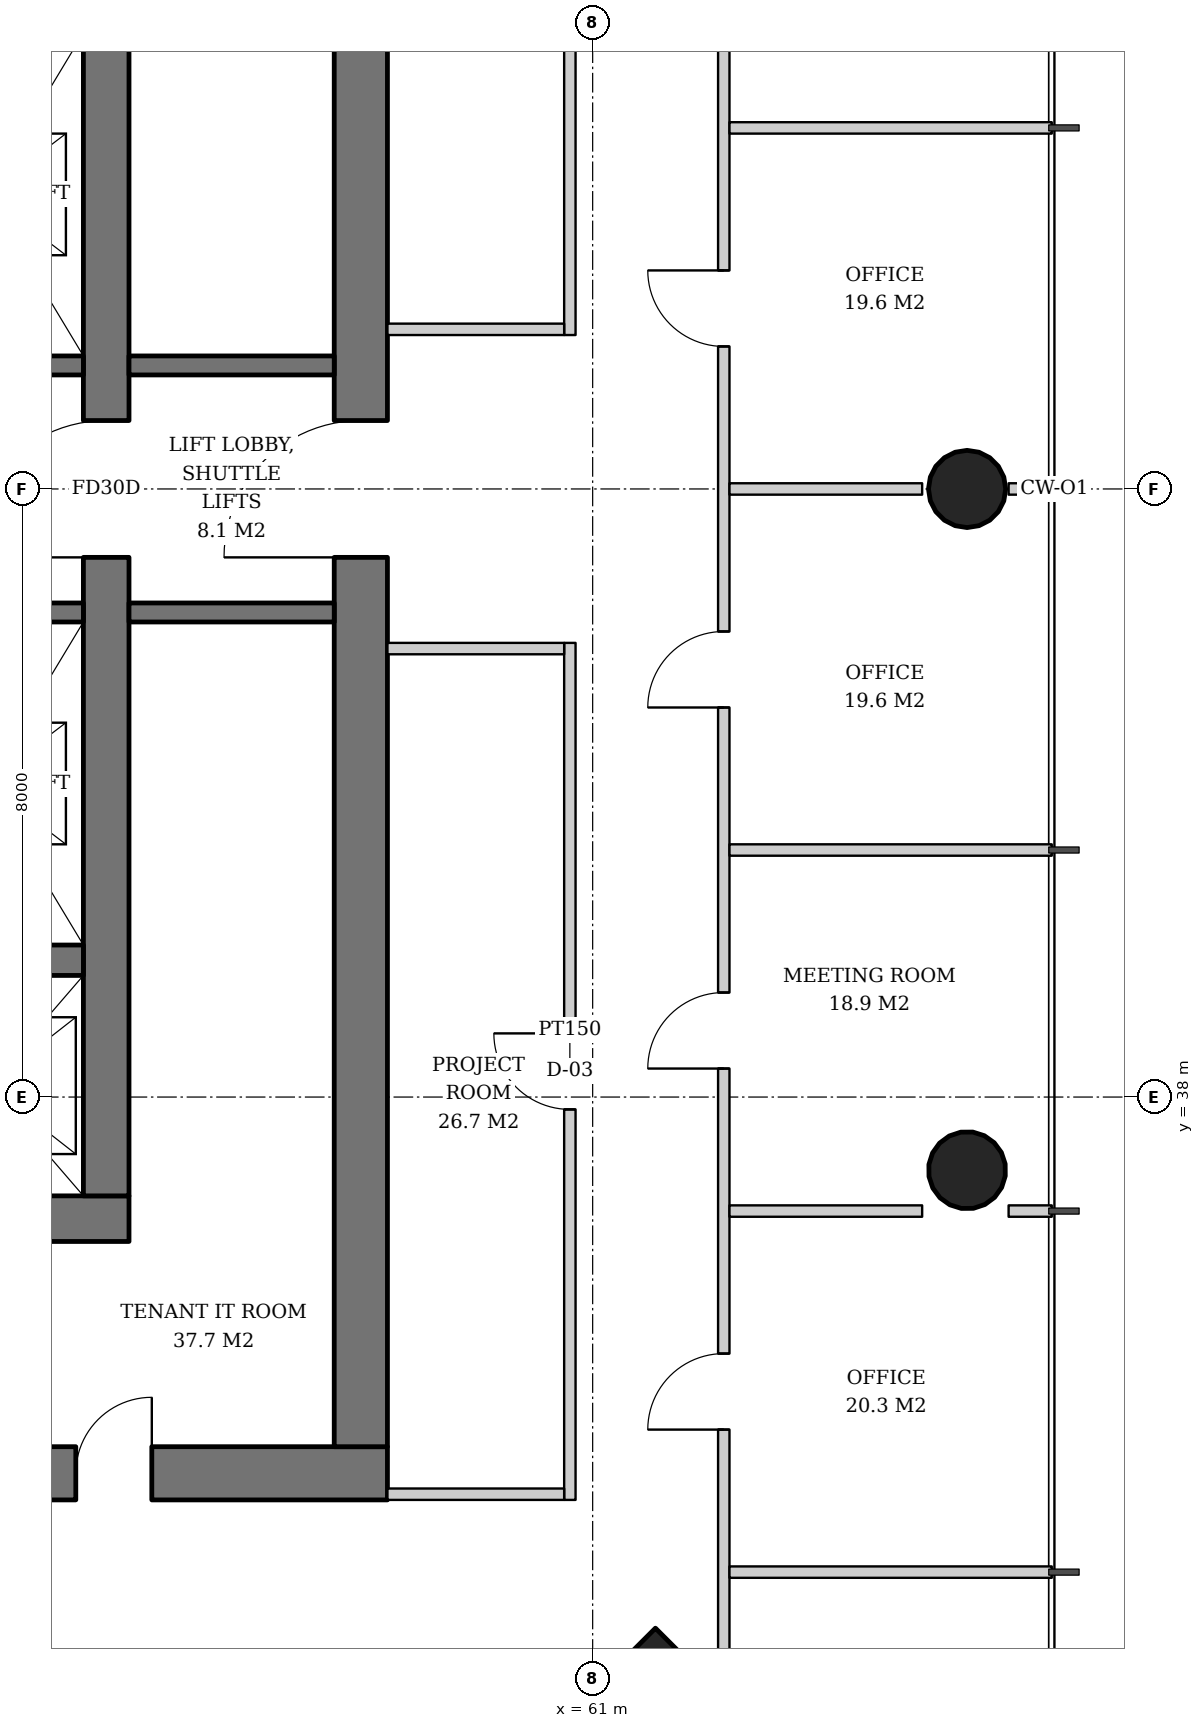
"""IFC4 building model, lengths in metres.
Left out: names, types, materials, properties, quantities, classifications, styles, units other than length and angle.
Written with IfcOpenShell. Run it as: python <this file> out.ifc"""

import sys

from ifc_helpers import new_model, si_unit, direction, frame, frame_2d, origin, origin_2d, place, context, subcontext, project, spatial, rectangle, hollow_circle, extrude, element, fill, save


model = new_model("IFC4")
c1 = context("Model", 3, precision=1e-05, world=origin(), true_north=direction((0.0, 1.0)))
c2 = subcontext(c1, "Body", "Model", "MODEL_VIEW")
j1 = project(units=[si_unit("LENGTHUNIT", "METRE"), si_unit("PLANEANGLEUNIT", "RADIAN")], contexts=[c1])
p1 = place(None, origin())
s1 = spatial("IfcSite", under=j1, at=p1, CompositionType="ELEMENT")
p2 = place(p1, origin())
s2 = spatial("IfcBuilding", under=s1, at=p2, CompositionType="ELEMENT")
p3 = place(p2, frame((0.0, 0.0, 116.0)))
s3 = spatial("IfcBuildingStorey", under=s2, at=p3, CompositionType="ELEMENT", Elevation=116.0)
p4 = place(p3, frame((65.964, 37.018, 0.0), z_axis=(-0.031974409754, 0.015987204877, 0.999360818924), x_axis=(-0.4472135955, -0.894427191, 0.0)))
e1 = element("IfcColumn", 1, at=p4, inside=s3, PredefinedType="COLUMN", context=c2, shape_type="SweptSolid", body=[
    extrude(hollow_circle(Radius=0.508, WallThickness=0.04, at=origin_2d()), origin(), (0.0, 0.0, 1.0), 3.802),
])
p5 = place(p3, frame((65.964, 46.0, 0.0), z_axis=(-0.031978496719, 0.0, 0.999488557087), x_axis=(0.0, -1.0, 0.0)))
e2 = element("IfcColumn", 2, at=p5, inside=s3, PredefinedType="COLUMN", context=c2, shape_type="SweptSolid", body=[
    extrude(hollow_circle(Radius=0.508, WallThickness=0.04, at=origin_2d()), origin(), (0.0, 0.0, 1.0), 3.802),
])
p6 = place(p3, frame((61.864, 29.136, 0.0), z_axis=(-0.031898107953, 0.031898107953, 0.998981992539), x_axis=(-0.707106781187, -0.707106781187, 0.0)))
e3 = element("IfcColumn", 3, at=p6, inside=s3, PredefinedType="COLUMN", context=c2, shape_type="SweptSolid", body=[
    extrude(rectangle(XDim=2.6, YDim=2.6, at=origin_2d()), origin(), (0.0, 0.0, 1.0), 3.804),
])
p7 = place(p3, frame((35.1, 36.4, 0.0), z_axis=(0.0, 0.0, 1.0), x_axis=(1.0, 0.0, 0.0)))
e4 = element("IfcWall", 4, at=p7, inside=s3, PredefinedType="SHEAR", context=c2, shape_type="SweptSolid", body=[
    extrude(rectangle(XDim=19.8, YDim=0.6, at=frame_2d((9.9, 0.0))), origin(), (0.0, 0.0, 1.0), 3.8),
])
p8 = place(p7, frame((3.9, 0.0, 0.0)))
e5 = element("IfcOpeningElement", 5, at=p8, cuts=e4, PredefinedType="OPENING", context=c2, shape_type="SweptSolid", body=[
    extrude(rectangle(XDim=1.0, YDim=2.1, at=frame_2d((0.5, 1.05))), frame((0.0, 0.31, 0.0), z_axis=(0.0, -1.0, 0.0), x_axis=(1.0, 0.0, 0.0)), (0.0, 0.0, 1.0), 0.62),
])
p9 = place(p7, frame((15.35, 0.0, 0.0)))
e6 = element("IfcOpeningElement", 6, at=p9, cuts=e4, PredefinedType="OPENING", context=c2, shape_type="SweptSolid", body=[
    extrude(rectangle(XDim=1.0, YDim=2.1, at=frame_2d((0.5, 1.05))), frame((0.0, 0.31, 0.0), z_axis=(0.0, -1.0, 0.0), x_axis=(1.0, 0.0, 0.0)), (0.0, 0.0, 1.0), 0.62),
])
p10 = place(p3, frame((54.6, 36.7, 0.0), z_axis=(0.0, 0.0, 1.0), x_axis=(0.0, 1.0, 0.0)))
e7 = element("IfcWall", 7, at=p10, inside=s3, PredefinedType="SHEAR", context=c2, shape_type="SweptSolid", body=[
    extrude(rectangle(XDim=18.6, YDim=0.6, at=frame_2d((9.3, 0.0))), origin(), (0.0, 0.0, 1.0), 3.8),
])
p11 = place(p10, frame((8.4, 0.0, 0.0)))
e8 = element("IfcOpeningElement", 8, at=p11, cuts=e7, PredefinedType="OPENING", context=c2, shape_type="SweptSolid", body=[
    extrude(rectangle(XDim=1.8, YDim=2.4, at=frame_2d((0.9, 1.2))), frame((0.0, 0.31, 0.0), z_axis=(0.0, -1.0, 0.0), x_axis=(1.0, 0.0, 0.0)), (0.0, 0.0, 1.0), 0.62),
])
p12 = place(p3, frame((31.7, 33.05, 0.0), z_axis=(0.0, 0.0, 1.0), x_axis=(1.0, 0.0, 0.0)))
e9 = element("IfcWall", 9, at=p12, inside=s3, PredefinedType="SHEAR", context=c2, shape_type="SweptSolid", body=[
    extrude(rectangle(XDim=26.6, YDim=0.7, at=frame_2d((13.3, 0.0))), origin(), (0.0, 0.0, 1.0), 3.8),
])
p13 = place(p12, frame((7.3, 0.0, 0.0)))
e10 = element("IfcOpeningElement", 10, at=p13, cuts=e9, PredefinedType="OPENING", context=c2, shape_type="SweptSolid", body=[
    extrude(rectangle(XDim=1.0, YDim=2.1, at=frame_2d((0.5, 1.05))), frame((0.0, 0.36, 0.0), z_axis=(0.0, -1.0, 0.0), x_axis=(1.0, 0.0, 0.0)), (0.0, 0.0, 1.0), 0.72),
])
p14 = place(p12, frame((18.75, 0.0, 0.0)))
e11 = element("IfcOpeningElement", 11, at=p14, cuts=e9, PredefinedType="OPENING", context=c2, shape_type="SweptSolid", body=[
    extrude(rectangle(XDim=1.0, YDim=2.1, at=frame_2d((0.5, 1.05))), frame((0.0, 0.36, 0.0), z_axis=(0.0, -1.0, 0.0), x_axis=(1.0, 0.0, 0.0)), (0.0, 0.0, 1.0), 0.72),
])
p15 = place(p12, frame((3.2, 0.0, 0.0)))
e12 = element("IfcOpeningElement", 12, at=p15, cuts=e9, PredefinedType="OPENING", context=c2, shape_type="SweptSolid", body=[
    extrude(rectangle(XDim=1.0, YDim=2.1, at=frame_2d((0.5, 1.05))), frame((0.0, 0.36, 0.0), z_axis=(0.0, -1.0, 0.0), x_axis=(1.0, 0.0, 0.0)), (0.0, 0.0, 1.0), 0.72),
])
p16 = place(p12, frame((10.42, 0.0, 0.0)))
e13 = element("IfcOpeningElement", 13, at=p16, cuts=e9, PredefinedType="OPENING", context=c2, shape_type="SweptSolid", body=[
    extrude(rectangle(XDim=1.0, YDim=2.1, at=frame_2d((0.5, 1.05))), frame((0.0, 0.36, 0.0), z_axis=(0.0, -1.0, 0.0), x_axis=(1.0, 0.0, 0.0)), (0.0, 0.0, 1.0), 0.72),
])
p17 = place(p12, frame((14.46, 0.0, 0.0)))
e14 = element("IfcOpeningElement", 14, at=p17, cuts=e9, PredefinedType="OPENING", context=c2, shape_type="SweptSolid", body=[
    extrude(rectangle(XDim=1.0, YDim=2.1, at=frame_2d((0.5, 1.05))), frame((0.0, 0.36, 0.0), z_axis=(0.0, -1.0, 0.0), x_axis=(1.0, 0.0, 0.0)), (0.0, 0.0, 1.0), 0.72),
])
p18 = place(p12, frame((22.5, 0.0, 0.0)))
e15 = element("IfcOpeningElement", 15, at=p18, cuts=e9, PredefinedType="OPENING", context=c2, shape_type="SweptSolid", body=[
    extrude(rectangle(XDim=1.0, YDim=2.1, at=frame_2d((0.5, 1.05))), frame((0.0, 0.36, 0.0), z_axis=(0.0, -1.0, 0.0), x_axis=(1.0, 0.0, 0.0)), (0.0, 0.0, 1.0), 0.72),
])
p19 = place(p3, frame((57.95, 33.4, 0.0), z_axis=(0.0, 0.0, 1.0), x_axis=(0.0, 1.0, 0.0)))
e16 = element("IfcWall", 16, at=p19, inside=s3, PredefinedType="SHEAR", context=c2, shape_type="SweptSolid", body=[
    extrude(rectangle(XDim=25.2, YDim=0.7, at=frame_2d((12.6, 0.0))), origin(), (0.0, 0.0, 1.0), 3.8),
])
p20 = place(p19, frame((11.7, 0.0, 0.0)))
e17 = element("IfcOpeningElement", 17, at=p20, cuts=e16, PredefinedType="OPENING", context=c2, shape_type="SweptSolid", body=[
    extrude(rectangle(XDim=1.8, YDim=2.4, at=frame_2d((0.9, 1.2))), frame((0.0, 0.36, 0.0), z_axis=(0.0, -1.0, 0.0), x_axis=(1.0, 0.0, 0.0)), (0.0, 0.0, 1.0), 0.72),
])
p21 = place(p3, frame((35.7, 39.8, 0.0), z_axis=(0.0, 0.0, 1.0), x_axis=(1.0, 0.0, 0.0)))
e18 = element("IfcWall", 18, at=p21, inside=s3, PredefinedType="SHEAR", context=c2, shape_type="SweptSolid", body=[
    extrude(rectangle(XDim=18.6, YDim=0.4, at=frame_2d((9.3, 0.0))), origin(), (0.0, 0.0, 1.0), 3.8),
])
for number, where, z_axis, x_axis in (
    (19, (48.93, 47.625, 0.0), (0.0, 0.0, 1.0), (1.0, 0.0, 0.0)),
    (20, (48.93, 44.375, 0.0), (0.0, 0.0, 1.0), (1.0, 0.0, 0.0)),
):
    element("IfcWall", number, at=place(p3, frame(where, z_axis=z_axis, x_axis=x_axis)), inside=s3, PredefinedType="SHEAR", context=c2, shape_type="SweptSolid", body=[
        extrude(rectangle(XDim=5.37, YDim=0.25, at=frame_2d((2.685, 0.0))), origin(), (0.0, 0.0, 1.0), 3.8),
    ])
for number, where, z_axis, x_axis in (
    (21, (54.9, 44.375, 0.0), (0.0, 0.0, 1.0), (1.0, 0.0, 0.0)),
    (22, (54.9, 47.625, 0.0), (0.0, 0.0, 1.0), (1.0, 0.0, 0.0)),
):
    element("IfcWall", number, at=place(p3, frame(where, z_axis=z_axis, x_axis=x_axis)), inside=s3, PredefinedType="SOLIDWALL", context=c2, shape_type="SweptSolid", body=[
        extrude(rectangle(XDim=2.7, YDim=0.25, at=frame_2d((1.35, 0.0))), origin(), (0.0, 0.0, 1.0), 3.62),
    ])
p22 = place(p3, frame((60.7, 32.7, 0.0), z_axis=(0.0, 0.0, 1.0), x_axis=(0.0, 1.0, 0.0)))
e23 = element("IfcWall", 23, at=p22, inside=s3, PredefinedType="PARTITIONING", context=c2, shape_type="SweptSolid", body=[
    extrude(rectangle(XDim=11.275, YDim=0.15, at=frame_2d((5.638, 0.0))), origin(), (0.0, 0.0, 1.0), 2.72),
])
p23 = place(p22, frame((5.137, 0.0, 0.0)))
e24 = element("IfcOpeningElement", 24, at=p23, cuts=e23, PredefinedType="OPENING", context=c2, shape_type="SweptSolid", body=[
    extrude(rectangle(XDim=1.0, YDim=2.1, at=frame_2d((0.5, 1.05))), frame((0.0, 0.085, 0.0), z_axis=(0.0, -1.0, 0.0), x_axis=(1.0, 0.0, 0.0)), (0.0, 0.0, 1.0), 0.17),
])
for number, where, z_axis, x_axis in (
    (25, (58.3, 32.775, 0.0), (0.0, 0.0, 1.0), (1.0, 0.0, 0.0)),
    (26, (58.3, 43.9, 0.0), (0.0, 0.0, 1.0), (1.0, 0.0, 0.0)),
):
    element("IfcWall", number, at=place(p3, frame(where, z_axis=z_axis, x_axis=x_axis)), inside=s3, PredefinedType="PARTITIONING", context=c2, shape_type="SweptSolid", body=[
        extrude(rectangle(XDim=2.325, YDim=0.15, at=frame_2d((1.163, 0.0))), origin(), (0.0, 0.0, 1.0), 3.62),
    ])
p24 = place(p3, frame((60.7, 48.025, 0.0), z_axis=(0.0, 0.0, 1.0), x_axis=(0.0, 1.0, 0.0)))
e27 = element("IfcWall", 27, at=p24, inside=s3, PredefinedType="PARTITIONING", context=c2, shape_type="SweptSolid", body=[
    extrude(rectangle(XDim=11.275, YDim=0.15, at=frame_2d((5.638, 0.0))), origin(), (0.0, 0.0, 1.0), 2.806),
])
p25 = place(p24, frame((5.137, 0.0, 0.0)))
e28 = element("IfcOpeningElement", 28, at=p25, cuts=e27, PredefinedType="OPENING", context=c2, shape_type="SweptSolid", body=[
    extrude(rectangle(XDim=1.0, YDim=2.1, at=frame_2d((0.5, 1.05))), frame((0.0, 0.085, 0.0), z_axis=(0.0, -1.0, 0.0), x_axis=(1.0, 0.0, 0.0)), (0.0, 0.0, 1.0), 0.17),
])
p26 = place(p3, frame((58.3, 48.1, 0.0), z_axis=(0.0, 0.0, 1.0), x_axis=(1.0, 0.0, 0.0)))
e29 = element("IfcWall", 29, at=p26, inside=s3, PredefinedType="PARTITIONING", context=c2, shape_type="SweptSolid", body=[
    extrude(rectangle(XDim=2.325, YDim=0.15, at=frame_2d((1.163, 0.0))), origin(), (0.0, 0.0, 1.0), 3.62),
])
p27 = place(p3, frame((62.725, 30.188, 0.0), z_axis=(0.0, 0.0, 1.0), x_axis=(0.0, 1.0, 0.0)))
e30 = element("IfcWall", 30, at=p27, inside=s3, PredefinedType="PARTITIONING", context=c2, shape_type="SweptSolid", body=[
    extrude(rectangle(XDim=31.623, YDim=0.15, at=frame_2d((15.812, 0.0))), origin(), (0.0, 0.0, 1.0), 2.72),
])
p28 = place(p27, frame((3.437, 0.0, 0.0)))
e31 = element("IfcOpeningElement", 31, at=p28, cuts=e30, PredefinedType="OPENING", context=c2, shape_type="SweptSolid", body=[
    extrude(rectangle(XDim=1.0, YDim=2.1, at=frame_2d((0.5, 1.05))), frame((0.0, 0.085, 0.0), z_axis=(0.0, -1.0, 0.0), x_axis=(1.0, 0.0, 0.0)), (0.0, 0.0, 1.0), 0.17),
])
p29 = place(p27, frame((8.187, 0.0, 0.0)))
e32 = element("IfcOpeningElement", 32, at=p29, cuts=e30, PredefinedType="OPENING", context=c2, shape_type="SweptSolid", body=[
    extrude(rectangle(XDim=1.0, YDim=2.1, at=frame_2d((0.5, 1.05))), frame((0.0, 0.085, 0.0), z_axis=(0.0, -1.0, 0.0), x_axis=(1.0, 0.0, 0.0)), (0.0, 0.0, 1.0), 0.17),
])
p30 = place(p27, frame((12.937, 0.0, 0.0)))
e33 = element("IfcOpeningElement", 33, at=p30, cuts=e30, PredefinedType="OPENING", context=c2, shape_type="SweptSolid", body=[
    extrude(rectangle(XDim=1.0, YDim=2.1, at=frame_2d((0.5, 1.05))), frame((0.0, 0.085, 0.0), z_axis=(0.0, -1.0, 0.0), x_axis=(1.0, 0.0, 0.0)), (0.0, 0.0, 1.0), 0.17),
])
p31 = place(p27, frame((17.687, 0.0, 0.0)))
e34 = element("IfcOpeningElement", 34, at=p31, cuts=e30, PredefinedType="OPENING", context=c2, shape_type="SweptSolid", body=[
    extrude(rectangle(XDim=1.0, YDim=2.1, at=frame_2d((0.5, 1.05))), frame((0.0, 0.085, 0.0), z_axis=(0.0, -1.0, 0.0), x_axis=(1.0, 0.0, 0.0)), (0.0, 0.0, 1.0), 0.17),
])
p32 = place(p27, frame((22.437, 0.0, 0.0)))
e35 = element("IfcOpeningElement", 35, at=p32, cuts=e30, PredefinedType="OPENING", context=c2, shape_type="SweptSolid", body=[
    extrude(rectangle(XDim=1.0, YDim=2.1, at=frame_2d((0.5, 1.05))), frame((0.0, 0.085, 0.0), z_axis=(0.0, -1.0, 0.0), x_axis=(1.0, 0.0, 0.0)), (0.0, 0.0, 1.0), 0.17),
])
p33 = place(p27, frame((27.187, 0.0, 0.0)))
e36 = element("IfcOpeningElement", 36, at=p33, cuts=e30, PredefinedType="OPENING", context=c2, shape_type="SweptSolid", body=[
    extrude(rectangle(XDim=1.0, YDim=2.1, at=frame_2d((0.5, 1.05))), frame((0.0, 0.085, 0.0), z_axis=(0.0, -1.0, 0.0), x_axis=(1.0, 0.0, 0.0)), (0.0, 0.0, 1.0), 0.17),
])
p34 = place(p3, frame((62.8, 31.75, 0.0), z_axis=(0.0, 0.0, 1.0), x_axis=(1.0, 0.0, 0.0)))
e37 = element("IfcWall", 37, at=p34, inside=s3, PredefinedType="PARTITIONING", context=c2, shape_type="SweptSolid", body=[
    extrude(rectangle(XDim=4.24, YDim=0.15, at=frame_2d((2.12, 0.0))), origin(), (0.0, 0.0, 1.0), 2.82),
])
p35 = place(p3, frame((62.8, 36.5, 0.0), z_axis=(0.0, 0.0, 1.0), x_axis=(1.0, 0.0, 0.0)))
e38 = element("IfcWall", 38, at=p35, inside=s3, PredefinedType="PARTITIONING", context=c2, shape_type="SweptSolid", body=[
    extrude(rectangle(XDim=2.535, YDim=0.15, at=frame_2d((1.268, 0.0))), origin(), (0.0, 0.0, 1.0), 3.62),
])
p36 = place(p3, frame((66.472, 36.5, 0.0), z_axis=(0.0, 0.0, 1.0), x_axis=(1.0, 0.0, 0.0)))
e39 = element("IfcWall", 39, at=p36, inside=s3, PredefinedType="PARTITIONING", context=c2, shape_type="SweptSolid", body=[
    extrude(rectangle(XDim=0.568, YDim=0.15, at=frame_2d((0.284, 0.0))), origin(), (0.0, 0.0, 1.0), 3.62),
])
p37 = place(p3, frame((62.8, 41.25, 0.0), z_axis=(0.0, 0.0, 1.0), x_axis=(1.0, 0.0, 0.0)))
e40 = element("IfcWall", 40, at=p37, inside=s3, PredefinedType="PARTITIONING", context=c2, shape_type="SweptSolid", body=[
    extrude(rectangle(XDim=4.24, YDim=0.15, at=frame_2d((2.12, 0.0))), origin(), (0.0, 0.0, 1.0), 2.82),
])
p38 = place(p3, frame((62.8, 46.0, 0.0), z_axis=(0.0, 0.0, 1.0), x_axis=(1.0, 0.0, 0.0)))
e41 = element("IfcWall", 41, at=p38, inside=s3, PredefinedType="PARTITIONING", context=c2, shape_type="SweptSolid", body=[
    extrude(rectangle(XDim=2.535, YDim=0.15, at=frame_2d((1.268, 0.0))), origin(), (0.0, 0.0, 1.0), 3.62),
])
p39 = place(p3, frame((66.472, 46.0, 0.0), z_axis=(0.0, 0.0, 1.0), x_axis=(1.0, 0.0, 0.0)))
e42 = element("IfcWall", 42, at=p39, inside=s3, PredefinedType="PARTITIONING", context=c2, shape_type="SweptSolid", body=[
    extrude(rectangle(XDim=0.568, YDim=0.15, at=frame_2d((0.284, 0.0))), origin(), (0.0, 0.0, 1.0), 3.62),
])
p40 = place(p3, frame((62.8, 50.75, 0.0), z_axis=(0.0, 0.0, 1.0), x_axis=(1.0, 0.0, 0.0)))
e43 = element("IfcWall", 43, at=p40, inside=s3, PredefinedType="PARTITIONING", context=c2, shape_type="SweptSolid", body=[
    extrude(rectangle(XDim=4.24, YDim=0.15, at=frame_2d((2.12, 0.0))), origin(), (0.0, 0.0, 1.0), 2.82),
])
p41 = place(p11, origin())
e44 = element("IfcDoor", 44, at=p41, inside=s3, OperationType="DOUBLE_DOOR_SINGLE_SWING", PredefinedType="DOOR", context=c2, shape_type="SweptSolid", body=[
    extrude(rectangle(XDim=1.8, YDim=2.4, at=frame_2d((0.9, 1.2))), frame((0.0, 0.025, 0.0), z_axis=(0.0, -1.0, 0.0), x_axis=(1.0, 0.0, 0.0)), (0.0, 0.0, 1.0), 0.05),
])
fill(e8, e44)
p42 = place(p20, origin())
e45 = element("IfcDoor", 45, at=p42, inside=s3, OperationType="DOUBLE_DOOR_SINGLE_SWING", PredefinedType="DOOR", context=c2, shape_type="SweptSolid", body=[
    extrude(rectangle(XDim=1.8, YDim=2.4, at=frame_2d((0.9, 1.2))), frame((0.0, 0.025, 0.0), z_axis=(0.0, -1.0, 0.0), x_axis=(1.0, 0.0, 0.0)), (0.0, 0.0, 1.0), 0.05),
])
fill(e17, e45)
p43 = place(p18, origin())
e46 = element("IfcDoor", 46, at=p43, inside=s3, OperationType="SINGLE_SWING_RIGHT", PredefinedType="DOOR", context=c2, shape_type="SweptSolid", body=[
    extrude(rectangle(XDim=1.0, YDim=2.1, at=frame_2d((0.5, 1.05))), frame((0.0, 0.34, 0.0), z_axis=(0.0, -1.0, 0.0), x_axis=(1.0, 0.0, 0.0)), (0.0, 0.0, 1.0), 0.05),
])
fill(e15, e46)
p44 = place(p23, origin())
e47 = element("IfcDoor", 47, at=p44, inside=s3, OperationType="SINGLE_SWING_RIGHT", PredefinedType="DOOR", context=c2, shape_type="SweptSolid", body=[
    extrude(rectangle(XDim=1.0, YDim=2.1, at=frame_2d((0.5, 1.05))), frame((0.0, 0.025, 0.0), z_axis=(0.0, -1.0, 0.0), x_axis=(1.0, 0.0, 0.0)), (0.0, 0.0, 1.0), 0.05),
])
fill(e24, e47)
p45 = place(p28, origin())
e48 = element("IfcDoor", 48, at=p45, inside=s3, OperationType="SINGLE_SWING_LEFT", PredefinedType="DOOR", context=c2, shape_type="SweptSolid", body=[
    extrude(rectangle(XDim=1.0, YDim=2.1, at=frame_2d((0.5, 1.05))), frame((0.0, 0.025, 0.0), z_axis=(0.0, -1.0, 0.0), x_axis=(1.0, 0.0, 0.0)), (0.0, 0.0, 1.0), 0.05),
])
fill(e31, e48)
p46 = place(p29, origin())
e49 = element("IfcDoor", 49, at=p46, inside=s3, OperationType="SINGLE_SWING_LEFT", PredefinedType="DOOR", context=c2, shape_type="SweptSolid", body=[
    extrude(rectangle(XDim=1.0, YDim=2.1, at=frame_2d((0.5, 1.05))), frame((0.0, 0.025, 0.0), z_axis=(0.0, -1.0, 0.0), x_axis=(1.0, 0.0, 0.0)), (0.0, 0.0, 1.0), 0.05),
])
fill(e32, e49)
p47 = place(p30, origin())
e50 = element("IfcDoor", 50, at=p47, inside=s3, OperationType="SINGLE_SWING_LEFT", PredefinedType="DOOR", context=c2, shape_type="SweptSolid", body=[
    extrude(rectangle(XDim=1.0, YDim=2.1, at=frame_2d((0.5, 1.05))), frame((0.0, 0.025, 0.0), z_axis=(0.0, -1.0, 0.0), x_axis=(1.0, 0.0, 0.0)), (0.0, 0.0, 1.0), 0.05),
])
fill(e33, e50)
p48 = place(p31, origin())
e51 = element("IfcDoor", 51, at=p48, inside=s3, OperationType="SINGLE_SWING_RIGHT", PredefinedType="DOOR", context=c2, shape_type="SweptSolid", body=[
    extrude(rectangle(XDim=1.0, YDim=2.1, at=frame_2d((0.5, 1.05))), frame((0.0, 0.025, 0.0), z_axis=(0.0, -1.0, 0.0), x_axis=(1.0, 0.0, 0.0)), (0.0, 0.0, 1.0), 0.05),
])
fill(e34, e51)
save(model, sys.argv[1])
